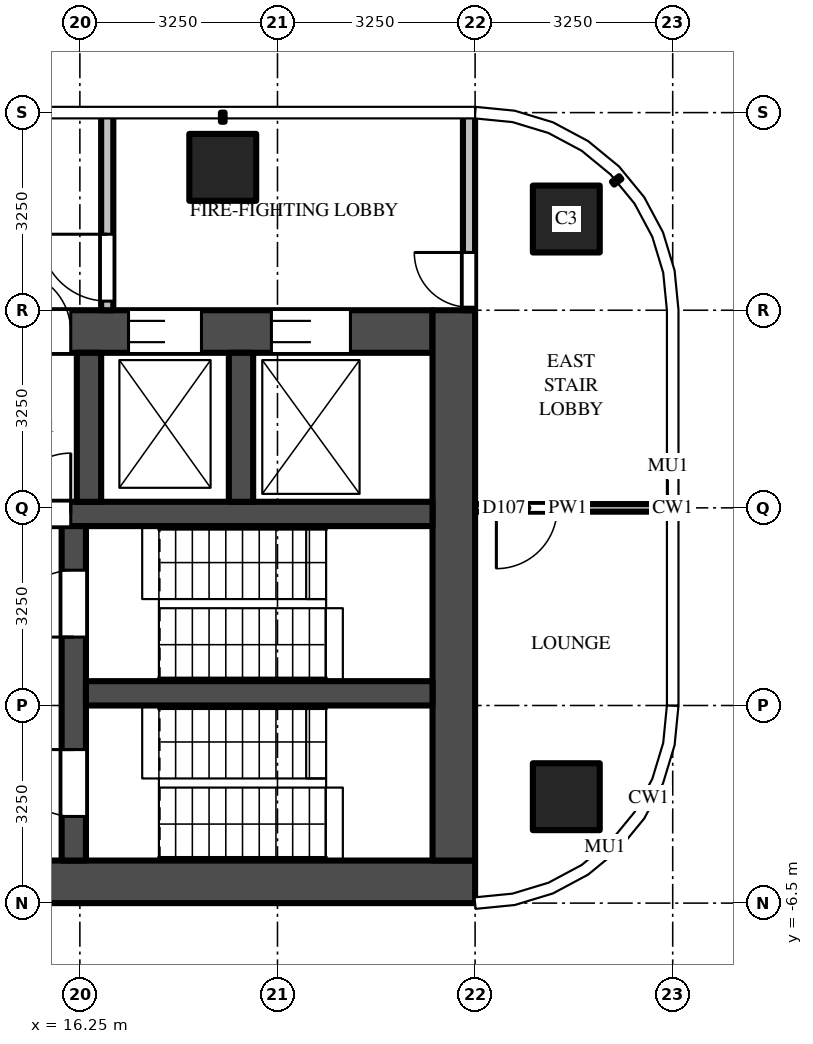
"""IFC4 building model, lengths in metres.
Left out: names, types, materials, properties, quantities, classifications, styles, units other than length and angle.
Written with IfcOpenShell. Run it as: python <this file> out.ifc"""

import sys

from ifc_helpers import new_model, si_unit, direction, frame, frame_2d, origin, origin_2d, place, context, subcontext, project, spatial, rectangle, extrude, source, transform, mapped, element, fill, save


model = new_model("IFC4")
c1 = context("Model", 3, precision=1e-05, world=origin(), true_north=direction((0.0, 1.0)))
c2 = subcontext(c1, "Body", "Model", "MODEL_VIEW")
j1 = project(units=[si_unit("LENGTHUNIT", "METRE"), si_unit("PLANEANGLEUNIT", "RADIAN")], contexts=[c1])
p1 = place(None, origin())
s1 = spatial("IfcSite", under=j1, at=p1, CompositionType="ELEMENT")
p2 = place(p1, origin())
s2 = spatial("IfcBuilding", under=s1, at=p2, CompositionType="ELEMENT")
p3 = place(p2, frame((0.0, 0.0, 236.3)))
s3 = spatial("IfcBuildingStorey", under=s2, at=p3, CompositionType="ELEMENT", Elevation=236.3)
m1 = source(origin(), c2, "Body", "SweptSolid", [
    extrude(rectangle(XDim=1.1, YDim=1.1, at=origin_2d()), origin(), (0.0, 0.0, 1.0), 3.9),
])
for number, where, z_axis, x_axis in (
    (1, (18.6, 5.6, 0.0), (0.0, 0.0, 1.0), (1.0, 0.0, 0.0)),
    (2, (24.25, 4.75, 0.0), (0.0, 0.0, 1.0), (1.0, 0.0, 0.0)),
    (3, (24.25, -4.75, 0.0), (0.0, 0.0, 1.0), (1.0, 0.0, 0.0)),
):
    element("IfcColumn", number, at=place(p3, frame(where, z_axis=z_axis, x_axis=x_axis)), inside=s3, PredefinedType="COLUMN", context=c2, shape_type="MappedRepresentation", body=[
        mapped(m1, transform((0.0, 0.0, 0.0))),
    ])
m2 = source(origin(), c2, "Body", "SweptSolid", [
    extrude(rectangle(XDim=16.6, YDim=0.7, at=frame_2d((8.3, 0.0))), origin(), (0.0, 0.0, 1.0), 3.7),
])
p4 = place(p3, frame((6.15, -6.15, 0.0), z_axis=(0.0, 0.0, 1.0), x_axis=(1.0, 0.0, 0.0)))
e4 = element("IfcWall", 4, at=p4, inside=s3, PredefinedType="SHEAR", context=c2, shape_type="MappedRepresentation", body=[
    mapped(m2, transform((0.0, 0.0, 0.0))),
])
m3 = source(origin(), c2, "Body", "SweptSolid", [
    extrude(rectangle(XDim=14.85, YDim=0.7, at=frame_2d((7.425, 0.0))), origin(), (0.0, 0.0, 1.0), 3.7),
])
p5 = place(p3, frame((7.2, 2.9, 0.0), z_axis=(0.0, 0.0, 1.0), x_axis=(1.0, 0.0, 0.0)))
e5 = element("IfcWall", 5, at=p5, inside=s3, PredefinedType="SHEAR", context=c2, shape_type="MappedRepresentation", body=[
    mapped(m3, transform((0.0, 0.0, 0.0))),
])
m4 = source(origin(), c2, "Body", "SweptSolid", [
    extrude(rectangle(XDim=1.1, YDim=2.1, at=frame_2d((0.55, 1.05))), frame((0.0, 0.36, 0.0), z_axis=(0.0, -1.0, 0.0), x_axis=(1.0, 0.0, 0.0)), (0.0, 0.0, 1.0), 0.72),
])
p6 = place(p5, frame((0.55, 0.0, 0.0)))
e6 = element("IfcOpeningElement", 6, at=p6, cuts=e5, PredefinedType="OPENING", context=c2, shape_type="MappedRepresentation", body=[
    mapped(m4, transform((0.0, 0.0, 0.0))),
])
p7 = place(p5, frame((3.15, 0.0, 0.0)))
e7 = element("IfcOpeningElement", 7, at=p7, cuts=e5, PredefinedType="OPENING", context=c2, shape_type="MappedRepresentation", body=[
    mapped(m4, transform((0.0, 0.0, 0.0))),
])
m5 = source(origin(), c2, "Body", "SweptSolid", [
    extrude(rectangle(XDim=1.2, YDim=2.1, at=frame_2d((0.6, 1.05))), frame((0.0, 0.36, 0.0), z_axis=(0.0, -1.0, 0.0), x_axis=(1.0, 0.0, 0.0)), (0.0, 0.0, 1.0), 0.72),
])
p8 = place(p5, frame((5.7, 0.0, 0.0)))
e8 = element("IfcOpeningElement", 8, at=p8, cuts=e5, PredefinedType="OPENING", context=c2, shape_type="MappedRepresentation", body=[
    mapped(m5, transform((0.0, 0.0, 0.0))),
])
m6 = source(origin(), c2, "Body", "SweptSolid", [
    extrude(rectangle(XDim=1.3, YDim=2.1, at=frame_2d((0.65, 1.05))), frame((0.0, 0.36, 0.0), z_axis=(0.0, -1.0, 0.0), x_axis=(1.0, 0.0, 0.0)), (0.0, 0.0, 1.0), 0.72),
])
p9 = place(p5, frame((12.2, 0.0, 0.0)))
e9 = element("IfcOpeningElement", 9, at=p9, cuts=e5, PredefinedType="OPENING", context=c2, shape_type="MappedRepresentation", body=[
    mapped(m6, transform((0.0, 0.0, 0.0))),
])
p10 = place(p5, frame((9.85, 0.0, 0.0)))
e10 = element("IfcOpeningElement", 10, at=p10, cuts=e5, PredefinedType="OPENING", context=c2, shape_type="MappedRepresentation", body=[
    mapped(m5, transform((0.0, 0.0, 0.0))),
])
m7 = source(origin(), c2, "Body", "SweptSolid", [
    extrude(rectangle(XDim=1.0, YDim=2.1, at=frame_2d((0.5, 1.05))), frame((0.0, 0.36, 0.0), z_axis=(0.0, -1.0, 0.0), x_axis=(1.0, 0.0, 0.0)), (0.0, 0.0, 1.0), 0.72),
])
p11 = place(p5, frame((7.9, 0.0, 0.0)))
e11 = element("IfcOpeningElement", 11, at=p11, cuts=e5, PredefinedType="OPENING", context=c2, shape_type="MappedRepresentation", body=[
    mapped(m7, transform((0.0, 0.0, 0.0))),
])
m8 = source(origin(), c2, "Body", "SweptSolid", [
    extrude(rectangle(XDim=9.05, YDim=0.7, at=frame_2d((4.525, 0.0))), origin(), (0.0, 0.0, 1.0), 3.7),
])
p12 = place(p3, frame((22.4, -5.8, 0.0), z_axis=(0.0, 0.0, 1.0), x_axis=(0.0, 1.0, 0.0)))
e12 = element("IfcWall", 12, at=p12, inside=s3, PredefinedType="SHEAR", context=c2, shape_type="MappedRepresentation", body=[
    mapped(m8, transform((0.0, 0.0, 0.0))),
])
m9 = source(origin(), c2, "Body", "SweptSolid", [
    extrude(rectangle(XDim=14.85, YDim=0.4, at=frame_2d((7.425, 0.0))), origin(), (0.0, 0.0, 1.0), 3.7),
])
p13 = place(p3, frame((7.2, -0.1, 0.0), z_axis=(0.0, 0.0, 1.0), x_axis=(1.0, 0.0, 0.0)))
e13 = element("IfcWall", 13, at=p13, inside=s3, PredefinedType="SHEAR", context=c2, shape_type="MappedRepresentation", body=[
    mapped(m9, transform((0.0, 0.0, 0.0))),
])
m10 = source(origin(), c2, "Body", "SweptSolid", [
    extrude(rectangle(XDim=1.0, YDim=2.1, at=frame_2d((0.5, 1.05))), frame((0.0, 0.21, 0.0), z_axis=(0.0, -1.0, 0.0), x_axis=(1.0, 0.0, 0.0)), (0.0, 0.0, 1.0), 0.42),
])
p14 = place(p13, frame((7.9, 0.0, 0.0)))
e14 = element("IfcOpeningElement", 14, at=p14, cuts=e13, PredefinedType="OPENING", context=c2, shape_type="MappedRepresentation", body=[
    mapped(m10, transform((0.0, 0.0, 0.0))),
])
m11 = source(origin(), c2, "Body", "SweptSolid", [
    extrude(rectangle(XDim=5.5, YDim=0.4, at=frame_2d((2.75, 0.0))), origin(), (0.0, 0.0, 1.0), 3.7),
])
p15 = place(p3, frame((16.15, -5.8, 0.0), z_axis=(0.0, 0.0, 1.0), x_axis=(0.0, 1.0, 0.0)))
e15 = element("IfcWall", 15, at=p15, inside=s3, PredefinedType="SHEAR", context=c2, shape_type="MappedRepresentation", body=[
    mapped(m11, transform((0.0, 0.0, 0.0))),
])
m12 = source(origin(), c2, "Body", "SweptSolid", [
    extrude(rectangle(XDim=1.1, YDim=2.1, at=frame_2d((0.55, 1.05))), frame((0.0, 0.21, 0.0), z_axis=(0.0, -1.0, 0.0), x_axis=(1.0, 0.0, 0.0)), (0.0, 0.0, 1.0), 0.42),
])
p16 = place(p15, frame((0.725, 0.0, 0.0)))
e16 = element("IfcOpeningElement", 16, at=p16, cuts=e15, PredefinedType="OPENING", context=c2, shape_type="MappedRepresentation", body=[
    mapped(m12, transform((0.0, 0.0, 0.0))),
])
p17 = place(p15, frame((3.675, 0.0, 0.0)))
e17 = element("IfcOpeningElement", 17, at=p17, cuts=e15, PredefinedType="OPENING", context=c2, shape_type="MappedRepresentation", body=[
    mapped(m12, transform((0.0, 0.0, 0.0))),
])
m13 = source(origin(), c2, "Body", "SweptSolid", [
    extrude(rectangle(XDim=5.7, YDim=0.4, at=frame_2d((2.85, 0.0))), origin(), (0.0, 0.0, 1.0), 3.7),
])
p18 = place(p3, frame((16.35, -3.05, 0.0), z_axis=(0.0, 0.0, 1.0), x_axis=(1.0, 0.0, 0.0)))
e18 = element("IfcWall", 18, at=p18, inside=s3, PredefinedType="SHEAR", context=c2, shape_type="MappedRepresentation", body=[
    mapped(m13, transform((0.0, 0.0, 0.0))),
])
m14 = source(origin(), c2, "Body", "SweptSolid", [
    extrude(rectangle(XDim=2.45, YDim=0.4, at=frame_2d((1.225, 0.0))), origin(), (0.0, 0.0, 1.0), 3.7),
])
for number, where, z_axis, x_axis in (
    (19, (16.4, 0.1, 0.0), (0.0, 0.0, 1.0), (0.0, 1.0, 0.0)),
    (20, (18.9, 0.1, 0.0), (0.0, 0.0, 1.0), (0.0, 1.0, 0.0)),
):
    element("IfcWall", number, at=place(p3, frame(where, z_axis=z_axis, x_axis=x_axis)), inside=s3, PredefinedType="SHEAR", context=c2, shape_type="MappedRepresentation", body=[
        mapped(m14, transform((0.0, 0.0, 0.0))),
    ])
m15 = source(origin(), c2, "Body", "SweptSolid", [
    extrude(rectangle(XDim=3.25, YDim=0.2, at=frame_2d((1.625, 0.0))), origin(), (0.0, 0.0, 1.0), 3.7),
])
p19 = place(p3, frame((16.7, 3.25, 0.0), z_axis=(0.0, 0.0, 1.0), x_axis=(0.0, 1.0, 0.0)))
e21 = element("IfcWall", 21, at=p19, inside=s3, PredefinedType="PARTITIONING", context=c2, shape_type="MappedRepresentation", body=[
    mapped(m15, transform((0.0, 0.0, 0.0))),
])
m16 = source(origin(), c2, "Body", "SweptSolid", [
    extrude(rectangle(XDim=1.1, YDim=2.1, at=frame_2d((0.55, 1.05))), frame((0.0, 0.11, 0.0), z_axis=(0.0, -1.0, 0.0), x_axis=(1.0, 0.0, 0.0)), (0.0, 0.0, 1.0), 0.22),
])
p20 = place(p19, frame((0.15, 0.0, 0.0)))
e22 = element("IfcOpeningElement", 22, at=p20, cuts=e21, PredefinedType="OPENING", context=c2, shape_type="MappedRepresentation", body=[
    mapped(m16, transform((0.0, 0.0, 0.0))),
])
p21 = place(p3, frame((22.65, 3.25, 0.0), z_axis=(0.0, 0.0, 1.0), x_axis=(0.0, 1.0, 0.0)))
e23 = element("IfcWall", 23, at=p21, inside=s3, PredefinedType="PARTITIONING", context=c2, shape_type="MappedRepresentation", body=[
    mapped(m15, transform((0.0, 0.0, 0.0))),
])
m17 = source(origin(), c2, "Body", "SweptSolid", [
    extrude(rectangle(XDim=0.9, YDim=2.1, at=frame_2d((0.45, 1.05))), frame((0.0, 0.11, 0.0), z_axis=(0.0, -1.0, 0.0), x_axis=(1.0, 0.0, 0.0)), (0.0, 0.0, 1.0), 0.22),
])
p22 = place(p21, frame((0.05, 0.0, 0.0)))
e24 = element("IfcOpeningElement", 24, at=p22, cuts=e23, PredefinedType="OPENING", context=c2, shape_type="MappedRepresentation", body=[
    mapped(m17, transform((0.0, 0.0, 0.0))),
])
m18 = source(origin(), c2, "Body", "SweptSolid", [
    extrude(rectangle(XDim=3.05, YDim=0.125, at=frame_2d((1.525, 0.0))), origin(), (0.0, 0.0, 1.0), 2.78),
])
p23 = place(p3, frame((25.8, 0.0, 0.0), z_axis=(0.0, 0.0, 1.0), x_axis=(-1.0, 0.0, 0.0)))
e25 = element("IfcWall", 25, at=p23, inside=s3, PredefinedType="PARTITIONING", context=c2, shape_type="MappedRepresentation", body=[
    mapped(m18, transform((0.0, 0.0, 0.0))),
])
m19 = source(origin(), c2, "Body", "SweptSolid", [
    extrude(rectangle(XDim=1.0, YDim=2.1, at=frame_2d((0.5, 1.05))), frame((0.0, 0.073, 0.0), z_axis=(0.0, -1.0, 0.0), x_axis=(1.0, 0.0, 0.0)), (0.0, 0.0, 1.0), 0.145),
])
p24 = place(p23, frame((1.7, 0.0, 0.0)))
e26 = element("IfcOpeningElement", 26, at=p24, cuts=e25, PredefinedType="OPENING", context=c2, shape_type="MappedRepresentation", body=[
    mapped(m19, transform((0.0, 0.0, 0.0))),
])
m20 = source(origin(), c2, "Body", "SweptSolid", [
    extrude(rectangle(XDim=1.3, YDim=2.1, at=frame_2d((0.65, 1.05))), frame((0.0, -0.275, 0.0), z_axis=(0.0, -1.0, 0.0), x_axis=(1.0, 0.0, 0.0)), (0.0, 0.0, 1.0), 0.05),
])
p25 = place(p9, origin())
e27 = element("IfcDoor", 27, at=p25, inside=s3, OperationType="DOUBLE_DOOR_SLIDING", PredefinedType="DOOR", context=c2, shape_type="MappedRepresentation", body=[
    mapped(m20, transform((0.0, 0.0, 0.0))),
])
fill(e9, e27)
m21 = source(origin(), c2, "Body", "SweptSolid", [
    extrude(rectangle(XDim=1.2, YDim=2.1, at=frame_2d((0.6, 1.05))), frame((0.0, -0.275, 0.0), z_axis=(0.0, -1.0, 0.0), x_axis=(1.0, 0.0, 0.0)), (0.0, 0.0, 1.0), 0.05),
])
p26 = place(p10, origin())
e28 = element("IfcDoor", 28, at=p26, inside=s3, OperationType="DOUBLE_DOOR_SLIDING", PredefinedType="DOOR", context=c2, shape_type="MappedRepresentation", body=[
    mapped(m21, transform((0.0, 0.0, 0.0))),
])
fill(e10, e28)
m22 = source(origin(), c2, "Body", "SweptSolid", [
    extrude(rectangle(XDim=1.1, YDim=2.1, at=frame_2d((0.55, 1.05))), frame((0.0, 0.025, 0.0), z_axis=(0.0, -1.0, 0.0), x_axis=(1.0, 0.0, 0.0)), (0.0, 0.0, 1.0), 0.05),
])
p27 = place(p16, origin())
e29 = element("IfcDoor", 29, at=p27, inside=s3, OperationType="SINGLE_SWING_RIGHT", PredefinedType="DOOR", context=c2, shape_type="MappedRepresentation", body=[
    mapped(m22, transform((0.0, 0.0, 0.0))),
])
fill(e16, e29)
p28 = place(p17, origin())
e30 = element("IfcDoor", 30, at=p28, inside=s3, OperationType="SINGLE_SWING_LEFT", PredefinedType="DOOR", context=c2, shape_type="MappedRepresentation", body=[
    mapped(m22, transform((0.0, 0.0, 0.0))),
])
fill(e17, e30)
m23 = source(origin(), c2, "Body", "SweptSolid", [
    extrude(rectangle(XDim=1.0, YDim=2.1, at=frame_2d((0.5, 1.05))), frame((0.0, 0.025, 0.0), z_axis=(0.0, -1.0, 0.0), x_axis=(1.0, 0.0, 0.0)), (0.0, 0.0, 1.0), 0.05),
])
p29 = place(p14, origin())
e31 = element("IfcDoor", 31, at=p29, inside=s3, OperationType="SINGLE_SWING_RIGHT", PredefinedType="DOOR", context=c2, shape_type="MappedRepresentation", body=[
    mapped(m23, transform((0.0, 0.0, 0.0))),
])
fill(e14, e31)
m24 = source(origin(), c2, "Body", "SweptSolid", [
    extrude(rectangle(XDim=1.0, YDim=2.1, at=frame_2d((0.5, 1.05))), frame((0.0, -0.275, 0.0), z_axis=(0.0, -1.0, 0.0), x_axis=(1.0, 0.0, 0.0)), (0.0, 0.0, 1.0), 0.05),
])
p30 = place(p11, origin())
e32 = element("IfcDoor", 32, at=p30, inside=s3, OperationType="SINGLE_SWING_LEFT", PredefinedType="DOOR", context=c2, shape_type="MappedRepresentation", body=[
    mapped(m24, transform((0.0, 0.0, 0.0))),
])
fill(e11, e32)
p31 = place(p20, origin())
e33 = element("IfcDoor", 33, at=p31, inside=s3, OperationType="SINGLE_SWING_RIGHT", PredefinedType="DOOR", context=c2, shape_type="MappedRepresentation", body=[
    mapped(m22, transform((0.0, 0.0, 0.0))),
])
fill(e22, e33)
m25 = source(origin(), c2, "Body", "SweptSolid", [
    extrude(rectangle(XDim=0.9, YDim=2.1, at=frame_2d((0.45, 1.05))), frame((0.0, 0.025, 0.0), z_axis=(0.0, -1.0, 0.0), x_axis=(1.0, 0.0, 0.0)), (0.0, 0.0, 1.0), 0.05),
])
p32 = place(p22, origin())
e34 = element("IfcDoor", 34, at=p32, inside=s3, OperationType="SINGLE_SWING_RIGHT", PredefinedType="DOOR", context=c2, shape_type="MappedRepresentation", body=[
    mapped(m25, transform((0.0, 0.0, 0.0))),
])
fill(e24, e34)
p33 = place(p24, origin())
e35 = element("IfcDoor", 35, at=p33, inside=s3, OperationType="SINGLE_SWING_RIGHT", PredefinedType="DOOR", context=c2, shape_type="MappedRepresentation", body=[
    mapped(m23, transform((0.0, 0.0, 0.0))),
])
fill(e26, e35)
save(model, sys.argv[1])
